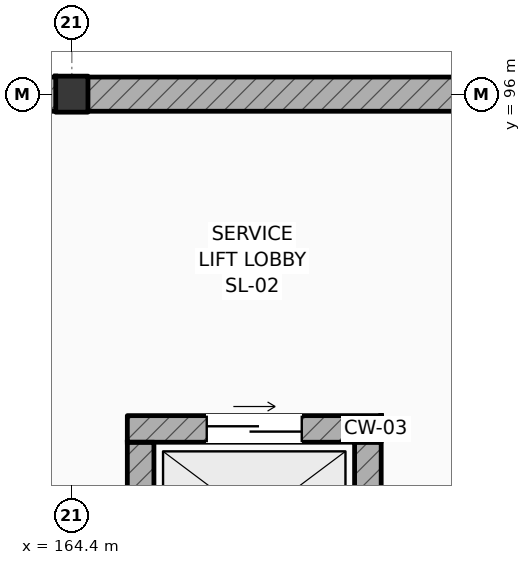
"""IFC4 building model, lengths in metres.
Left out: names, types, materials, properties, quantities, classifications, styles, units other than length and angle.
Written with IfcOpenShell. Run it as: python <this file> out.ifc"""

import sys

from ifc_helpers import new_model, si_unit, direction, frame, frame_2d, origin, origin_2d, place, context, subcontext, project, spatial, rectangle, i_section, extrude, element, fill, save


model = new_model("IFC4")
c1 = context("Model", 3, precision=1e-05, world=origin(), true_north=direction((0.0, 1.0)))
c2 = subcontext(c1, "Body", "Model", "MODEL_VIEW")
j1 = project(units=[si_unit("LENGTHUNIT", "METRE"), si_unit("PLANEANGLEUNIT", "RADIAN")], contexts=[c1])
p1 = place(None, origin())
s1 = spatial("IfcSite", under=j1, at=p1, CompositionType="ELEMENT")
p2 = place(p1, origin())
s2 = spatial("IfcBuilding", under=s1, at=p2, CompositionType="ELEMENT")
p3 = place(p2, frame((0.0, 0.0, -4.5)))
s3 = spatial("IfcBuildingStorey", under=s2, at=p3, CompositionType="ELEMENT", Elevation=-4.5)
p4 = place(p3, frame((172.0, 96.0, 0.0), z_axis=(0.0, 0.0, 1.0), x_axis=(-1.0, 0.0, 0.0)))
e1 = element("IfcWall", 1, at=p4, inside=s3, PredefinedType="SOLIDWALL", context=c2, shape_type="SweptSolid", body=[
    extrude(rectangle(XDim=52.0, YDim=0.45, at=frame_2d((26.0, 0.0))), origin(), (0.0, 0.0, 1.0), 4.5),
])
p5 = place(p3, frame((164.4, 96.0, 0.0), z_axis=(0.0, 0.0, 1.0), x_axis=(1.0, 0.0, 0.0)))
e2 = element("IfcColumn", 2, at=p5, inside=s3, PredefinedType="COLUMN", context=c2, shape_type="SweptSolid", body=[
    extrude(i_section(OverallWidth=0.424, OverallDepth=0.474, WebThickness=0.045, FlangeThickness=0.055, FilletRadius=0.015, at=origin_2d()), origin(), (0.0, 0.0, 1.0), 4.5),
])
p6 = place(p3, frame((165.13, 91.595, 0.0), z_axis=(0.0, 0.0, 1.0), x_axis=(1.0, 0.0, 0.0)))
e3 = element("IfcWall", 3, at=p6, inside=s3, PredefinedType="SHEAR", context=c2, shape_type="SweptSolid", body=[
    extrude(rectangle(XDim=3.34, YDim=0.35, at=frame_2d((1.67, 0.0))), origin(), (0.0, 0.0, 1.0), 4.1),
])
p7 = place(p6, frame((1.045, 0.0, 0.0)))
e4 = element("IfcOpeningElement", 4, at=p7, cuts=e3, PredefinedType="OPENING", context=c2, shape_type="SweptSolid", body=[
    extrude(rectangle(XDim=1.25, YDim=2.25, at=frame_2d((0.625, 1.125))), frame((0.0, 0.185, 0.0), z_axis=(0.0, -1.0, 0.0), x_axis=(1.0, 0.0, 0.0)), (0.0, 0.0, 1.0), 0.37),
])
for number, where, z_axis, x_axis in (
    (5, (165.305, 89.38, 0.0), (0.0, 0.0, 1.0), (0.0, 1.0, 0.0)),
    (6, (168.295, 89.38, 0.0), (0.0, 0.0, 1.0), (0.0, 1.0, 0.0)),
):
    element("IfcWall", number, at=place(p3, frame(where, z_axis=z_axis, x_axis=x_axis)), inside=s3, PredefinedType="SHEAR", context=c2, shape_type="SweptSolid", body=[
        extrude(rectangle(XDim=2.04, YDim=0.35, at=frame_2d((1.02, 0.0))), origin(), (0.0, 0.0, 1.0), 4.1),
    ])
p8 = place(p7, origin())
e7 = element("IfcDoor", 7, at=p8, inside=s3, OperationType="SLIDING_TO_LEFT", PredefinedType="DOOR", context=c2, shape_type="SweptSolid", body=[
    extrude(rectangle(XDim=1.25, YDim=2.25, at=frame_2d((0.625, 1.125))), frame((0.0, 0.025, 0.0), z_axis=(0.0, -1.0, 0.0), x_axis=(1.0, 0.0, 0.0)), (0.0, 0.0, 1.0), 0.05),
])
fill(e4, e7)
save(model, sys.argv[1])
